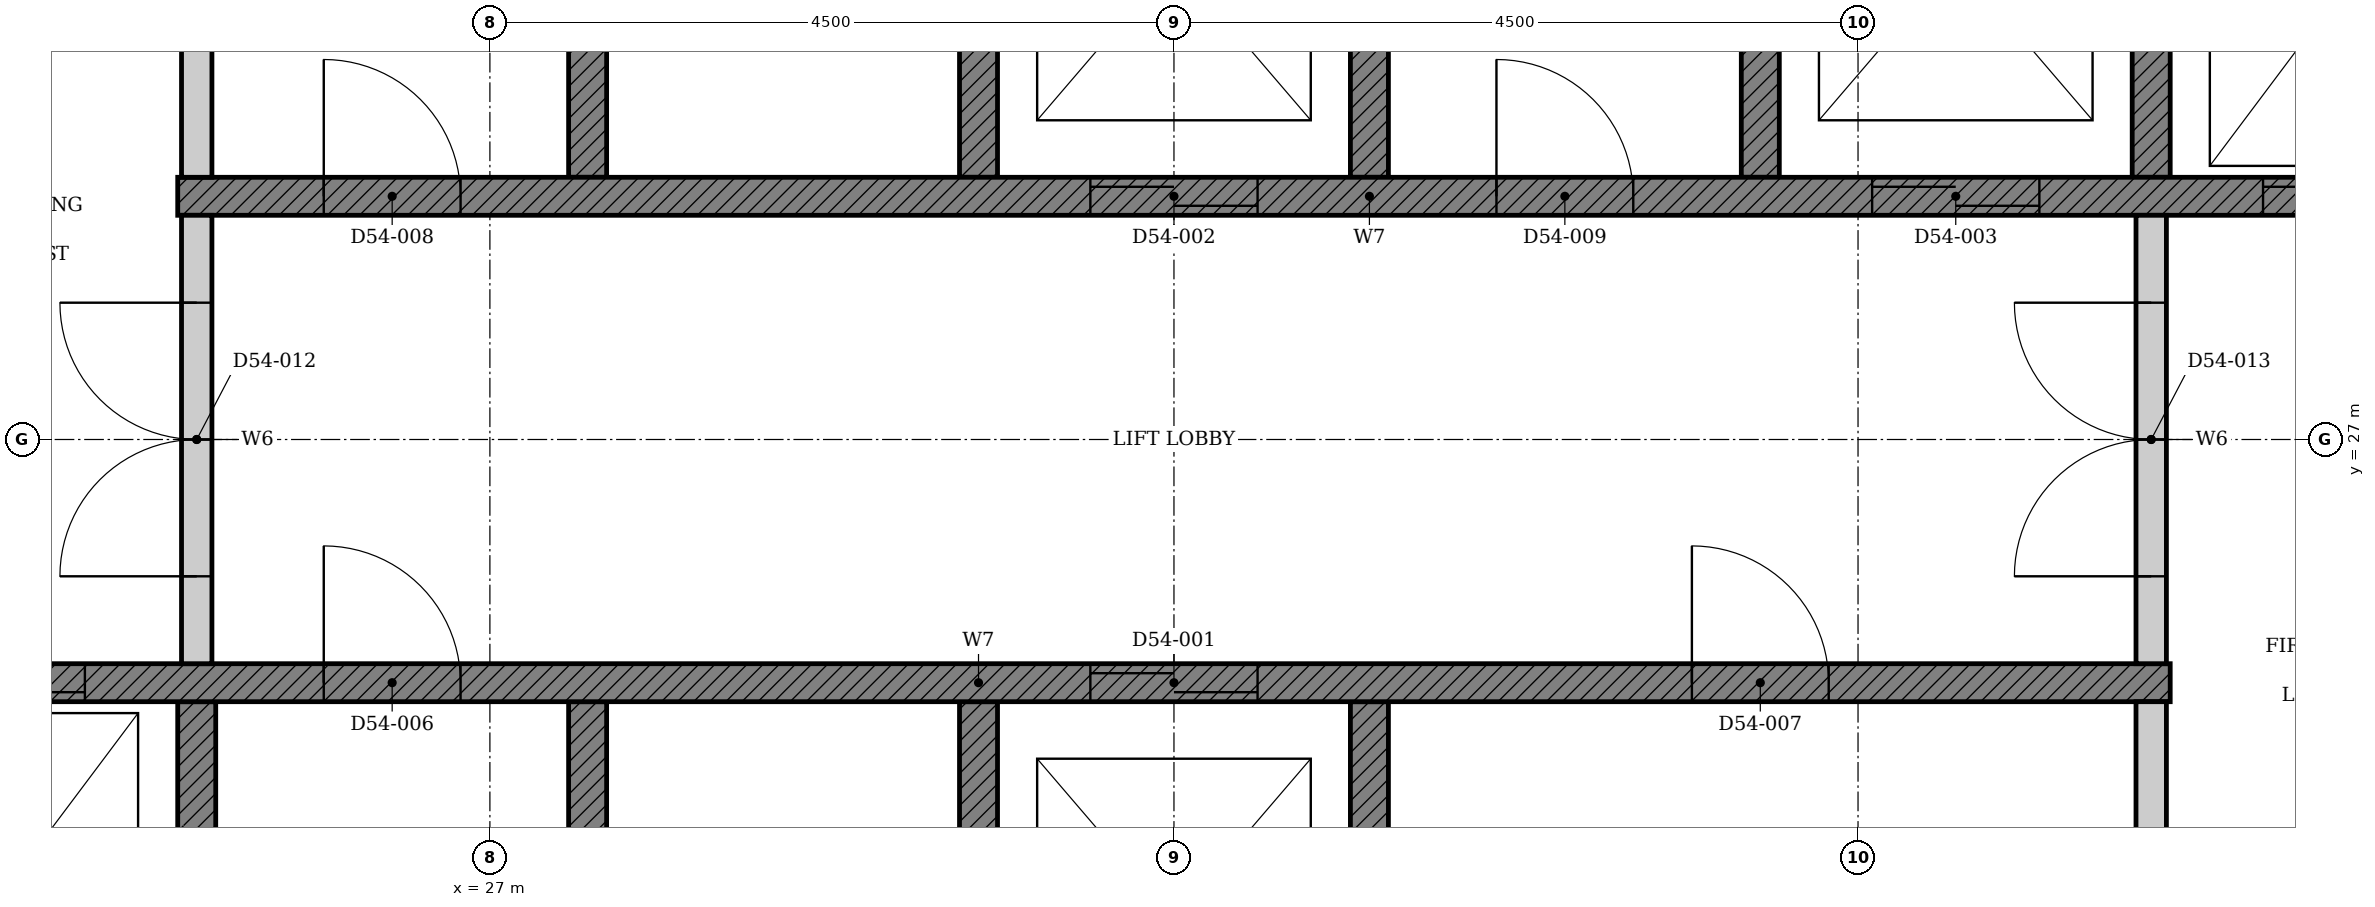
"""IFC4 building model, lengths in metres.
Left out: names, types, materials, properties, quantities, classifications, styles, units other than length and angle.
Written with IfcOpenShell. Run it as: python <this file> out.ifc"""

import sys

from ifc_helpers import new_model, si_unit, direction, frame, frame_2d, origin, place, context, subcontext, project, spatial, polyline, rectangle, outline, extrude, element, fill, save


model = new_model("IFC4")
c1 = context("Model", 3, precision=1e-05, world=origin(), true_north=direction((0.0, 1.0)))
c2 = subcontext(c1, "Body", "Model", "MODEL_VIEW")
j1 = project(units=[si_unit("LENGTHUNIT", "METRE"), si_unit("PLANEANGLEUNIT", "RADIAN")], contexts=[c1])
p1 = place(None, origin())
s1 = spatial("IfcSite", under=j1, at=p1, CompositionType="ELEMENT")
p2 = place(p1, origin())
s2 = spatial("IfcBuilding", under=s1, at=p2, CompositionType="ELEMENT")
p3 = place(p2, frame((0.0, 0.0, 214.6)))
s3 = spatial("IfcBuildingStorey", under=s2, at=p3, CompositionType="ELEMENT", Elevation=214.6)
p4 = place(p3, origin())
e1 = element("IfcWall", 1, at=p4, inside=s3, PredefinedType="SHEAR", context=c2, shape_type="SweptSolid", body=[
    extrude(outline(polyline([(22.375, 22.35), (25.197, 22.35), (25.197, 25.275), (24.947, 25.275), (24.947, 22.65), (22.625, 22.65), (22.625, 25.275), (22.375, 25.275), (22.375, 22.35)])), origin(), (0.0, 0.0, 1.0), 3.4),
])
p5 = place(p3, origin())
e2 = element("IfcWall", 2, at=p5, inside=s3, PredefinedType="SHEAR", context=c2, shape_type="SweptSolid", body=[
    extrude(outline(polyline([(27.518, 22.35), (32.911, 22.35), (32.911, 25.275), (32.661, 25.275), (32.661, 22.65), (30.339, 22.65), (30.339, 25.275), (30.089, 25.275), (30.089, 22.65), (27.768, 22.65), (27.768, 25.275), (27.518, 25.275), (27.518, 22.35)])), origin(), (0.0, 0.0, 1.0), 3.4),
])
p6 = place(p3, origin())
e3 = element("IfcWall", 3, at=p6, inside=s3, PredefinedType="SHEAR", context=c2, shape_type="SweptSolid", body=[
    extrude(outline(polyline([(27.518, 28.725), (27.768, 28.725), (27.768, 31.35), (30.089, 31.35), (30.089, 28.725), (30.339, 28.725), (30.339, 31.35), (32.661, 31.35), (32.661, 28.725), (32.911, 28.725), (32.911, 31.65), (27.518, 31.65), (27.518, 28.725)])), origin(), (0.0, 0.0, 1.0), 3.4),
])
p7 = place(p3, origin())
e4 = element("IfcWall", 4, at=p7, inside=s3, PredefinedType="SHEAR", context=c2, shape_type="SweptSolid", body=[
    extrude(outline(polyline([(35.232, 28.725), (35.482, 28.725), (35.482, 31.35), (37.803, 31.35), (37.803, 28.725), (38.053, 28.725), (38.053, 31.35), (40.375, 31.35), (40.375, 28.725), (40.625, 28.725), (40.625, 31.65), (35.232, 31.65), (35.232, 28.725)])), origin(), (0.0, 0.0, 1.0), 3.4),
])
p8 = place(p3, frame((22.375, 25.4, 0.0), z_axis=(0.0, 0.0, 1.0), x_axis=(1.0, 0.0, 0.0)))
e5 = element("IfcWall", 5, at=p8, inside=s3, PredefinedType="SHEAR", context=c2, shape_type="SweptSolid", body=[
    extrude(rectangle(XDim=15.678, YDim=0.25, at=frame_2d((7.839, 0.0))), origin(), (0.0, 0.0, 1.0), 3.4),
])
p9 = place(p8, frame((8.575, 0.0, 0.0)))
e6 = element("IfcOpeningElement", 6, at=p9, cuts=e5, PredefinedType="OPENING", context=c2, shape_type="SweptSolid", body=[
    extrude(rectangle(XDim=1.1, YDim=2.1, at=frame_2d((0.55, 1.05))), frame((0.0, 0.135, 0.0), z_axis=(0.0, -1.0, 0.0), x_axis=(1.0, 0.0, 0.0)), (0.0, 0.0, 1.0), 0.27),
])
p10 = place(p8, frame((0.861, 0.0, 0.0)))
e7 = element("IfcOpeningElement", 7, at=p10, cuts=e5, PredefinedType="OPENING", context=c2, shape_type="SweptSolid", body=[
    extrude(rectangle(XDim=1.1, YDim=2.1, at=frame_2d((0.55, 1.05))), frame((0.0, 0.135, 0.0), z_axis=(0.0, -1.0, 0.0), x_axis=(1.0, 0.0, 0.0)), (0.0, 0.0, 1.0), 0.27),
])
p11 = place(p8, frame((3.532, 0.0, 0.0)))
e8 = element("IfcOpeningElement", 8, at=p11, cuts=e5, PredefinedType="OPENING", context=c2, shape_type="SweptSolid", body=[
    extrude(rectangle(XDim=0.9, YDim=2.1, at=frame_2d((0.45, 1.05))), frame((0.0, 0.135, 0.0), z_axis=(0.0, -1.0, 0.0), x_axis=(1.0, 0.0, 0.0)), (0.0, 0.0, 1.0), 0.27),
])
p12 = place(p8, frame((12.532, 0.0, 0.0)))
e9 = element("IfcOpeningElement", 9, at=p12, cuts=e5, PredefinedType="OPENING", context=c2, shape_type="SweptSolid", body=[
    extrude(rectangle(XDim=0.9, YDim=2.1, at=frame_2d((0.45, 1.05))), frame((0.0, 0.135, 0.0), z_axis=(0.0, -1.0, 0.0), x_axis=(1.0, 0.0, 0.0)), (0.0, 0.0, 1.0), 0.27),
])
p13 = place(p3, frame((24.947, 28.6, 0.0), z_axis=(0.0, 0.0, 1.0), x_axis=(1.0, 0.0, 0.0)))
e10 = element("IfcWall", 10, at=p13, inside=s3, PredefinedType="SHEAR", context=c2, shape_type="SweptSolid", body=[
    extrude(rectangle(XDim=15.678, YDim=0.25, at=frame_2d((7.839, 0.0))), origin(), (0.0, 0.0, 1.0), 3.4),
])
p14 = place(p13, frame((6.004, 0.0, 0.0)))
e11 = element("IfcOpeningElement", 11, at=p14, cuts=e10, PredefinedType="OPENING", context=c2, shape_type="SweptSolid", body=[
    extrude(rectangle(XDim=1.1, YDim=2.1, at=frame_2d((0.55, 1.05))), frame((0.0, 0.135, 0.0), z_axis=(0.0, -1.0, 0.0), x_axis=(1.0, 0.0, 0.0)), (0.0, 0.0, 1.0), 0.27),
])
p15 = place(p13, frame((11.146, 0.0, 0.0)))
e12 = element("IfcOpeningElement", 12, at=p15, cuts=e10, PredefinedType="OPENING", context=c2, shape_type="SweptSolid", body=[
    extrude(rectangle(XDim=1.1, YDim=2.1, at=frame_2d((0.55, 1.05))), frame((0.0, 0.135, 0.0), z_axis=(0.0, -1.0, 0.0), x_axis=(1.0, 0.0, 0.0)), (0.0, 0.0, 1.0), 0.27),
])
p16 = place(p13, frame((13.718, 0.0, 0.0)))
e13 = element("IfcOpeningElement", 13, at=p16, cuts=e10, PredefinedType="OPENING", context=c2, shape_type="SweptSolid", body=[
    extrude(rectangle(XDim=1.1, YDim=2.1, at=frame_2d((0.55, 1.05))), frame((0.0, 0.135, 0.0), z_axis=(0.0, -1.0, 0.0), x_axis=(1.0, 0.0, 0.0)), (0.0, 0.0, 1.0), 0.27),
])
p17 = place(p13, frame((0.961, 0.0, 0.0)))
e14 = element("IfcOpeningElement", 14, at=p17, cuts=e10, PredefinedType="OPENING", context=c2, shape_type="SweptSolid", body=[
    extrude(rectangle(XDim=0.9, YDim=2.1, at=frame_2d((0.45, 1.05))), frame((0.0, 0.135, 0.0), z_axis=(0.0, -1.0, 0.0), x_axis=(1.0, 0.0, 0.0)), (0.0, 0.0, 1.0), 0.27),
])
p18 = place(p13, frame((8.675, 0.0, 0.0)))
e15 = element("IfcOpeningElement", 15, at=p18, cuts=e10, PredefinedType="OPENING", context=c2, shape_type="SweptSolid", body=[
    extrude(rectangle(XDim=0.9, YDim=2.1, at=frame_2d((0.45, 1.05))), frame((0.0, 0.135, 0.0), z_axis=(0.0, -1.0, 0.0), x_axis=(1.0, 0.0, 0.0)), (0.0, 0.0, 1.0), 0.27),
])
for number, where, z_axis, x_axis in (
    (16, (37.928, 22.65, 0.0), (0.0, 0.0, 1.0), (0.0, 1.0, 0.0)),
    (17, (25.072, 28.725, 0.0), (0.0, 0.0, 1.0), (0.0, 1.0, 0.0)),
):
    element("IfcWall", number, at=place(p3, frame(where, z_axis=z_axis, x_axis=x_axis)), inside=s3, PredefinedType="PARTITIONING", context=c2, shape_type="SweptSolid", body=[
        extrude(rectangle(XDim=2.625, YDim=0.2, at=frame_2d((1.312, 0.0))), origin(), (0.0, 0.0, 1.0), 3.4),
    ])
p19 = place(p3, frame((25.072, 25.525, 0.0), z_axis=(0.0, 0.0, 1.0), x_axis=(0.0, 1.0, 0.0)))
e18 = element("IfcWall", 18, at=p19, inside=s3, PredefinedType="PARTITIONING", context=c2, shape_type="SweptSolid", body=[
    extrude(rectangle(XDim=2.95, YDim=0.2, at=frame_2d((1.475, 0.0))), origin(), (0.0, 0.0, 1.0), 3.4),
])
p20 = place(p19, frame((0.575, 0.0, 0.0)))
e19 = element("IfcOpeningElement", 19, at=p20, cuts=e18, PredefinedType="OPENING", context=c2, shape_type="SweptSolid", body=[
    extrude(rectangle(XDim=1.8, YDim=2.1, at=frame_2d((0.9, 1.05))), frame((0.0, 0.11, 0.0), z_axis=(0.0, -1.0, 0.0), x_axis=(1.0, 0.0, 0.0)), (0.0, 0.0, 1.0), 0.22),
])
p21 = place(p3, frame((37.928, 25.525, 0.0), z_axis=(0.0, 0.0, 1.0), x_axis=(0.0, 1.0, 0.0)))
e20 = element("IfcWall", 20, at=p21, inside=s3, PredefinedType="PARTITIONING", context=c2, shape_type="SweptSolid", body=[
    extrude(rectangle(XDim=2.95, YDim=0.2, at=frame_2d((1.475, 0.0))), origin(), (0.0, 0.0, 1.0), 3.4),
])
p22 = place(p21, frame((0.575, 0.0, 0.0)))
e21 = element("IfcOpeningElement", 21, at=p22, cuts=e20, PredefinedType="OPENING", context=c2, shape_type="SweptSolid", body=[
    extrude(rectangle(XDim=1.8, YDim=2.1, at=frame_2d((0.9, 1.05))), frame((0.0, 0.11, 0.0), z_axis=(0.0, -1.0, 0.0), x_axis=(1.0, 0.0, 0.0)), (0.0, 0.0, 1.0), 0.22),
])
p23 = place(p9, origin())
e22 = element("IfcDoor", 22, at=p23, inside=s3, OperationType="DOUBLE_DOOR_SLIDING", PredefinedType="DOOR", context=c2, shape_type="SweptSolid", body=[
    extrude(rectangle(XDim=1.1, YDim=2.1, at=frame_2d((0.55, 1.05))), frame((0.0, 0.025, 0.0), z_axis=(0.0, -1.0, 0.0), x_axis=(1.0, 0.0, 0.0)), (0.0, 0.0, 1.0), 0.05),
])
fill(e6, e22)
p24 = place(p14, origin())
e23 = element("IfcDoor", 23, at=p24, inside=s3, OperationType="DOUBLE_DOOR_SLIDING", PredefinedType="DOOR", context=c2, shape_type="SweptSolid", body=[
    extrude(rectangle(XDim=1.1, YDim=2.1, at=frame_2d((0.55, 1.05))), frame((0.0, 0.025, 0.0), z_axis=(0.0, -1.0, 0.0), x_axis=(1.0, 0.0, 0.0)), (0.0, 0.0, 1.0), 0.05),
])
fill(e11, e23)
p25 = place(p15, origin())
e24 = element("IfcDoor", 24, at=p25, inside=s3, OperationType="DOUBLE_DOOR_SLIDING", PredefinedType="DOOR", context=c2, shape_type="SweptSolid", body=[
    extrude(rectangle(XDim=1.1, YDim=2.1, at=frame_2d((0.55, 1.05))), frame((0.0, 0.025, 0.0), z_axis=(0.0, -1.0, 0.0), x_axis=(1.0, 0.0, 0.0)), (0.0, 0.0, 1.0), 0.05),
])
fill(e12, e24)
p26 = place(p10, origin())
e25 = element("IfcDoor", 25, at=p26, inside=s3, OperationType="DOUBLE_DOOR_SLIDING", PredefinedType="DOOR", context=c2, shape_type="SweptSolid", body=[
    extrude(rectangle(XDim=1.1, YDim=2.1, at=frame_2d((0.55, 1.05))), frame((0.0, 0.025, 0.0), z_axis=(0.0, -1.0, 0.0), x_axis=(1.0, 0.0, 0.0)), (0.0, 0.0, 1.0), 0.05),
])
fill(e7, e25)
p27 = place(p16, origin())
e26 = element("IfcDoor", 26, at=p27, inside=s3, OperationType="DOUBLE_DOOR_SLIDING", PredefinedType="DOOR", context=c2, shape_type="SweptSolid", body=[
    extrude(rectangle(XDim=1.1, YDim=2.1, at=frame_2d((0.55, 1.05))), frame((0.0, 0.025, 0.0), z_axis=(0.0, -1.0, 0.0), x_axis=(1.0, 0.0, 0.0)), (0.0, 0.0, 1.0), 0.05),
])
fill(e13, e26)
p28 = place(p11, origin())
e27 = element("IfcDoor", 27, at=p28, inside=s3, OperationType="SINGLE_SWING_LEFT", PredefinedType="DOOR", context=c2, shape_type="SweptSolid", body=[
    extrude(rectangle(XDim=0.9, YDim=2.1, at=frame_2d((0.45, 1.05))), frame((0.0, 0.025, 0.0), z_axis=(0.0, -1.0, 0.0), x_axis=(1.0, 0.0, 0.0)), (0.0, 0.0, 1.0), 0.05),
])
fill(e8, e27)
p29 = place(p12, origin())
e28 = element("IfcDoor", 28, at=p29, inside=s3, OperationType="SINGLE_SWING_LEFT", PredefinedType="DOOR", context=c2, shape_type="SweptSolid", body=[
    extrude(rectangle(XDim=0.9, YDim=2.1, at=frame_2d((0.45, 1.05))), frame((0.0, 0.025, 0.0), z_axis=(0.0, -1.0, 0.0), x_axis=(1.0, 0.0, 0.0)), (0.0, 0.0, 1.0), 0.05),
])
fill(e9, e28)
p30 = place(p17, origin())
e29 = element("IfcDoor", 29, at=p30, inside=s3, OperationType="SINGLE_SWING_LEFT", PredefinedType="DOOR", context=c2, shape_type="SweptSolid", body=[
    extrude(rectangle(XDim=0.9, YDim=2.1, at=frame_2d((0.45, 1.05))), frame((0.0, 0.025, 0.0), z_axis=(0.0, -1.0, 0.0), x_axis=(1.0, 0.0, 0.0)), (0.0, 0.0, 1.0), 0.05),
])
fill(e14, e29)
p31 = place(p18, origin())
e30 = element("IfcDoor", 30, at=p31, inside=s3, OperationType="SINGLE_SWING_LEFT", PredefinedType="DOOR", context=c2, shape_type="SweptSolid", body=[
    extrude(rectangle(XDim=0.9, YDim=2.1, at=frame_2d((0.45, 1.05))), frame((0.0, 0.025, 0.0), z_axis=(0.0, -1.0, 0.0), x_axis=(1.0, 0.0, 0.0)), (0.0, 0.0, 1.0), 0.05),
])
fill(e15, e30)
p32 = place(p20, origin())
e31 = element("IfcDoor", 31, at=p32, inside=s3, OperationType="DOUBLE_DOOR_SINGLE_SWING", PredefinedType="DOOR", context=c2, shape_type="SweptSolid", body=[
    extrude(rectangle(XDim=1.8, YDim=2.1, at=frame_2d((0.9, 1.05))), frame((0.0, 0.025, 0.0), z_axis=(0.0, -1.0, 0.0), x_axis=(1.0, 0.0, 0.0)), (0.0, 0.0, 1.0), 0.05),
])
fill(e19, e31)
p33 = place(p22, origin())
e32 = element("IfcDoor", 32, at=p33, inside=s3, OperationType="DOUBLE_DOOR_SINGLE_SWING", PredefinedType="DOOR", context=c2, shape_type="SweptSolid", body=[
    extrude(rectangle(XDim=1.8, YDim=2.1, at=frame_2d((0.9, 1.05))), frame((0.0, 0.025, 0.0), z_axis=(0.0, -1.0, 0.0), x_axis=(1.0, 0.0, 0.0)), (0.0, 0.0, 1.0), 0.05),
])
fill(e21, e32)
save(model, sys.argv[1])
